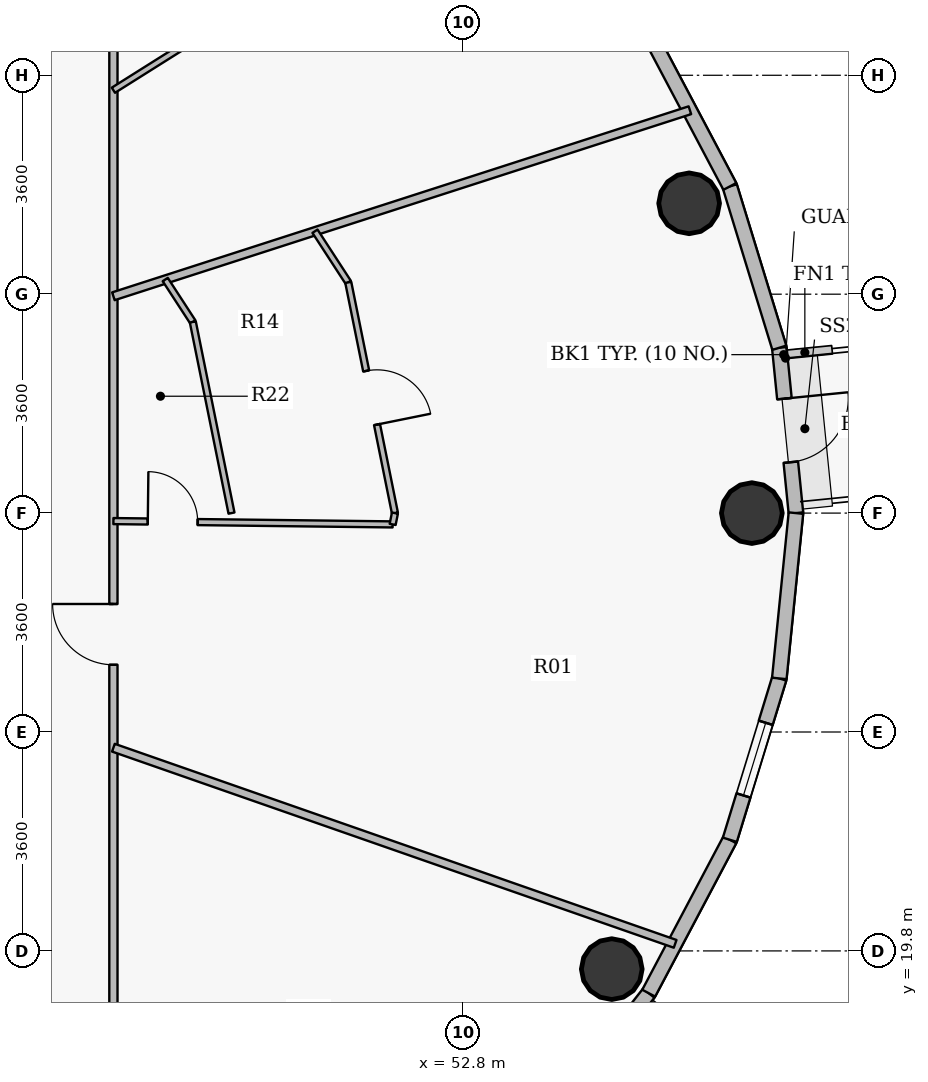
"""IFC4 building model, lengths in metres.
Left out: names, types, materials, properties, quantities, classifications, styles, units other than length and angle.
Written with IfcOpenShell. Run it as: python <this file> out.ifc"""

import sys

from ifc_helpers import new_model, si_unit, direction, frame, frame_2d, origin, origin_2d, place, context, subcontext, project, spatial, rectangle, hollow_circle, extrude, source, transform, mapped, element, fill, save


model = new_model("IFC4")
c1 = context("Model", 3, precision=1e-05, world=origin(), true_north=direction((0.0, 1.0)))
c2 = subcontext(c1, "Body", "Model", "MODEL_VIEW")
j1 = project(units=[si_unit("LENGTHUNIT", "METRE"), si_unit("PLANEANGLEUNIT", "RADIAN")], contexts=[c1])
p1 = place(None, origin())
s1 = spatial("IfcSite", under=j1, at=p1, CompositionType="ELEMENT")
p2 = place(p1, origin())
s2 = spatial("IfcBuilding", under=s1, at=p2, CompositionType="ELEMENT")
p3 = place(p2, frame((0.0, 0.0, 299.25)))
s3 = spatial("IfcBuildingStorey", under=s2, at=p3, CompositionType="ELEMENT", Elevation=299.25)
for number, where, z_axis, x_axis in (
    (1, (57.55, 27.0, 0.0), (0.0, 0.0, 1.0), (1.0, 0.0, 0.0)),
    (2, (56.519, 32.094, 0.0), (0.0, 0.0, 1.0), (1.0, 0.0, 0.0)),
    (3, (55.246, 19.5, 0.0), (0.0, 0.0, 1.0), (1.0, 0.0, 0.0)),
):
    element("IfcColumn", number, at=place(p3, frame(where, z_axis=z_axis, x_axis=x_axis)), inside=s3, PredefinedType="COLUMN", context=c2, shape_type="SweptSolid", body=[
        extrude(hollow_circle(Radius=0.5, WallThickness=0.032, at=origin_2d()), origin(), (0.0, 0.0, 1.0), 3.75),
    ])
p4 = place(p3, frame((58.002, 29.719, 0.0), z_axis=(0.0, 0.0, 1.0), x_axis=(0.099972526841, -0.99499019788, 0.0)))
e4 = element("IfcWall", 4, at=p4, inside=s3, PredefinedType="SOLIDWALL", context=c2, shape_type="SweptSolid", body=[
    extrude(rectangle(XDim=2.733, YDim=0.24, at=frame_2d((1.366, 0.0))), origin(), (0.0, 0.0, 1.0), 3.5),
])
p5 = place(p4, frame((0.841, 0.0, 0.0)))
e5 = element("IfcOpeningElement", 5, at=p5, cuts=e4, PredefinedType="OPENING", context=c2, shape_type="SweptSolid", body=[
    extrude(rectangle(XDim=1.05, YDim=2.15, at=origin_2d()), frame((0.525, 0.13, 1.075), z_axis=(0.0, -1.0, 0.0), x_axis=(1.0, 0.0, 0.0)), (0.0, 0.0, 1.0), 0.26),
])
p6 = place(p3, frame((57.188, 32.372, 0.0), z_axis=(0.0, 0.0, 1.0), x_axis=(0.2931213403, -0.956075248012, 0.0)))
e6 = element("IfcWall", 6, at=p6, inside=s3, PredefinedType="SOLIDWALL", context=c2, shape_type="SweptSolid", body=[
    extrude(rectangle(XDim=2.775, YDim=0.24, at=frame_2d((1.388, 0.0))), origin(), (0.0, 0.0, 1.0), 3.5),
])
p7 = place(p3, frame((55.854, 34.895, 0.0), z_axis=(0.0, 0.0, 1.0), x_axis=(0.467628269026, -0.883925224218, 0.0)))
e7 = element("IfcWall", 7, at=p7, inside=s3, PredefinedType="SOLIDWALL", context=c2, shape_type="SweptSolid", body=[
    extrude(rectangle(XDim=2.854, YDim=0.24, at=frame_2d((1.427, 0.0))), origin(), (0.0, 0.0, 1.0), 3.5),
])
p8 = place(p3, frame((55.854, 19.105, 0.0), z_axis=(0.0, 0.0, 1.0), x_axis=(-0.616337186556, -0.787482363275, 0.0)))
e8 = element("IfcWall", 8, at=p8, inside=s3, PredefinedType="SOLIDWALL", context=c2, shape_type="SweptSolid", body=[
    extrude(rectangle(XDim=2.958, YDim=0.24, at=frame_2d((1.479, 0.0))), origin(), (0.0, 0.0, 1.0), 3.5),
])
p9 = place(p8, frame((0.854, 0.0, 0.9)))
e9 = element("IfcOpeningElement", 9, at=p9, cuts=e8, PredefinedType="OPENING", context=c2, shape_type="SweptSolid", body=[
    extrude(rectangle(XDim=1.25, YDim=1.65, at=origin_2d()), frame((0.625, 0.13, 0.825), z_axis=(0.0, -1.0, 0.0), x_axis=(1.0, 0.0, 0.0)), (0.0, 0.0, 1.0), 0.26),
])
p10 = place(p3, frame((57.188, 21.628, 0.0), z_axis=(0.0, 0.0, 1.0), x_axis=(-0.467628269026, -0.883925224218, 0.0)))
e10 = element("IfcWall", 10, at=p10, inside=s3, PredefinedType="SOLIDWALL", context=c2, shape_type="SweptSolid", body=[
    extrude(rectangle(XDim=2.854, YDim=0.24, at=frame_2d((1.427, 0.0))), origin(), (0.0, 0.0, 1.0), 3.5),
])
p11 = place(p3, frame((58.002, 24.281, 0.0), z_axis=(0.0, 0.0, 1.0), x_axis=(-0.2931213403, -0.956075248012, 0.0)))
e11 = element("IfcWall", 11, at=p11, inside=s3, PredefinedType="SOLIDWALL", context=c2, shape_type="SweptSolid", body=[
    extrude(rectangle(XDim=2.775, YDim=0.24, at=frame_2d((1.388, 0.0))), origin(), (0.0, 0.0, 1.0), 3.5),
])
p12 = place(p11, frame((0.763, 0.0, 0.9)))
e12 = element("IfcOpeningElement", 12, at=p12, cuts=e11, PredefinedType="OPENING", context=c2, shape_type="SweptSolid", body=[
    extrude(rectangle(XDim=1.25, YDim=1.65, at=origin_2d()), frame((0.625, 0.13, 0.825), z_axis=(0.0, -1.0, 0.0), x_axis=(1.0, 0.0, 0.0)), (0.0, 0.0, 1.0), 0.26),
])
p13 = place(p3, frame((58.275, 27.0, 0.0), z_axis=(0.0, 0.0, 1.0), x_axis=(-0.099972526841, -0.99499019788, 0.0)))
e13 = element("IfcWall", 13, at=p13, inside=s3, PredefinedType="SOLIDWALL", context=c2, shape_type="SweptSolid", body=[
    extrude(rectangle(XDim=2.733, YDim=0.24, at=frame_2d((1.366, 0.0))), origin(), (0.0, 0.0, 1.0), 3.5),
])
p14 = place(p3, frame((47.05, 18.35, 0.0), z_axis=(0.0, 0.0, 1.0), x_axis=(0.0, 1.0, 0.0)))
e14 = element("IfcWall", 14, at=p14, inside=s3, PredefinedType="PARTITIONING", context=c2, shape_type="SweptSolid", body=[
    extrude(rectangle(XDim=17.3, YDim=0.135, at=frame_2d((8.65, 0.0))), origin(), (0.0, 0.0, 1.0), 3.035),
])
p15 = place(p14, frame((6.155, 0.0, 0.0)))
e15 = element("IfcOpeningElement", 15, at=p15, cuts=e14, PredefinedType="OPENING", context=c2, shape_type="SweptSolid", body=[
    extrude(rectangle(XDim=1.0, YDim=2.15, at=origin_2d()), frame((0.5, 0.078, 1.075), z_axis=(0.0, -1.0, 0.0), x_axis=(1.0, 0.0, 0.0)), (0.0, 0.0, 1.0), 0.155),
])
p16 = place(p3, frame((47.05, 23.142, 0.0), z_axis=(0.0, 0.0, 1.0), x_axis=(0.94410974345, -0.329631297547, 0.0)))
e16 = element("IfcWall", 16, at=p16, inside=s3, PredefinedType="PARTITIONING", context=c2, shape_type="SweptSolid", body=[
    extrude(rectangle(XDim=9.785, YDim=0.135, at=frame_2d((4.893, 0.0))), origin(), (0.0, 0.0, 1.0), 2.985),
])
p17 = place(p3, frame((47.05, 26.869, 0.0), z_axis=(0.0, 0.0, 1.0), x_axis=(0.999929100649, -0.011907714968, 0.0)))
e17 = element("IfcWall", 17, at=p17, inside=s3, PredefinedType="PARTITIONING", context=c2, shape_type="SweptSolid", body=[
    extrude(rectangle(XDim=4.593, YDim=0.1, at=frame_2d((2.296, 0.0))), origin(), (0.0, 0.0, 1.0), 3.035),
])
p18 = place(p17, frame((0.565, 0.0, 0.0)))
e18 = element("IfcOpeningElement", 18, at=p18, cuts=e17, PredefinedType="OPENING", context=c2, shape_type="SweptSolid", body=[
    extrude(rectangle(XDim=0.82, YDim=2.1, at=origin_2d()), frame((0.41, 0.06, 1.05), z_axis=(0.0, -1.0, 0.0), x_axis=(1.0, 0.0, 0.0)), (0.0, 0.0, 1.0), 0.12),
])
p19 = place(p3, frame((47.05, 30.565, 0.0), z_axis=(0.0, 0.0, 1.0), x_axis=(0.951682976888, 0.307082255269, 0.0)))
e19 = element("IfcWall", 19, at=p19, inside=s3, PredefinedType="PARTITIONING", context=c2, shape_type="SweptSolid", body=[
    extrude(rectangle(XDim=9.963, YDim=0.135, at=frame_2d((4.981, 0.0))), origin(), (0.0, 0.0, 1.0), 2.985),
])
p20 = place(p3, frame((47.05, 33.954, 0.0), z_axis=(0.0, 0.0, 1.0), x_axis=(0.846339777122, 0.532643390704, 0.0)))
e20 = element("IfcWall", 20, at=p20, inside=s3, PredefinedType="PARTITIONING", context=c2, shape_type="SweptSolid", body=[
    extrude(rectangle(XDim=7.395, YDim=0.1, at=frame_2d((3.698, 0.0))), origin(), (0.0, 0.0, 1.0), 2.985),
])
p21 = place(p20, frame((3.248, 0.0, 0.0)))
e21 = element("IfcOpeningElement", 21, at=p21, cuts=e20, PredefinedType="OPENING", context=c2, shape_type="SweptSolid", body=[
    extrude(rectangle(XDim=0.9, YDim=2.1, at=origin_2d()), frame((0.45, 0.06, 1.05), z_axis=(0.0, -1.0, 0.0), x_axis=(1.0, 0.0, 0.0)), (0.0, 0.0, 1.0), 0.12),
])
p22 = place(p3, frame((47.903, 30.841, 0.0), z_axis=(0.0, 0.0, 1.0), x_axis=(0.545586849168, -0.838054288227, 0.0)))
e22 = element("IfcWall", 22, at=p22, inside=s3, PredefinedType="PARTITIONING", context=c2, shape_type="SweptSolid", body=[
    extrude(rectangle(XDim=0.832, YDim=0.1, at=frame_2d((0.416, 0.0))), origin(), (0.0, 0.0, 1.0), 3.035),
])
p23 = place(p3, frame((48.356, 30.144, 0.0), z_axis=(0.0, 0.0, 1.0), x_axis=(0.198208908342, -0.98015979751, 0.0)))
e23 = element("IfcWall", 23, at=p23, inside=s3, PredefinedType="PARTITIONING", context=c2, shape_type="SweptSolid", body=[
    extrude(rectangle(XDim=3.208, YDim=0.1, at=frame_2d((1.604, 0.0))), origin(), (0.0, 0.0, 1.0), 3.035),
])
p24 = place(p3, frame((50.365, 31.635, 0.0), z_axis=(0.0, 0.0, 1.0), x_axis=(0.545458599095, -0.83813776712, 0.0)))
e24 = element("IfcWall", 24, at=p24, inside=s3, PredefinedType="PARTITIONING", context=c2, shape_type="SweptSolid", body=[
    extrude(rectangle(XDim=1.003, YDim=0.1, at=frame_2d((0.502, 0.0))), origin(), (0.0, 0.0, 1.0), 3.035),
])
p25 = place(p3, frame((50.913, 30.794, 0.0), z_axis=(0.0, 0.0, 1.0), x_axis=(0.198226068862, -0.980156327135, 0.0)))
e25 = element("IfcWall", 25, at=p25, inside=s3, PredefinedType="PARTITIONING", context=c2, shape_type="SweptSolid", body=[
    extrude(rectangle(XDim=3.871, YDim=0.1, at=frame_2d((1.936, 0.0))), origin(), (0.0, 0.0, 1.0), 3.035),
])
p26 = place(p25, frame((1.486, 0.0, 0.0)))
e26 = element("IfcOpeningElement", 26, at=p26, cuts=e25, PredefinedType="OPENING", context=c2, shape_type="SweptSolid", body=[
    extrude(rectangle(XDim=0.9, YDim=2.1, at=origin_2d()), frame((0.45, 0.06, 1.05), z_axis=(0.0, -1.0, 0.0), x_axis=(1.0, 0.0, 0.0)), (0.0, 0.0, 1.0), 0.12),
])
p27 = place(p3, frame((51.642, 26.814, 0.0), z_axis=(0.0, 0.0, 1.0), x_axis=(0.198094703821, 0.980182885138, 0.0)))
e27 = element("IfcWall", 27, at=p27, inside=s3, PredefinedType="PARTITIONING", context=c2, shape_type="SweptSolid", body=[
    extrude(rectangle(XDim=0.19, YDim=0.1, at=frame_2d((0.095, 0.0))), origin(), (0.0, 0.0, 1.0), 3.035),
])
m1 = source(origin(), c2, "Body", "SweptSolid", [
    extrude(rectangle(XDim=1.05, YDim=2.15, at=origin_2d()), frame((0.525, 0.025, 1.075), z_axis=(0.0, -1.0, 0.0), x_axis=(1.0, 0.0, 0.0)), (0.0, 0.0, 1.0), 0.05),
])
p28 = place(p5, origin())
e28 = element("IfcDoor", 28, at=p28, inside=s3, OperationType="SINGLE_SWING_LEFT", PredefinedType="DOOR", context=c2, shape_type="MappedRepresentation", body=[
    mapped(m1, transform((0.0, 0.0, 0.0), x_axis=(1.0, 0.0, 0.0), y_axis=(0.0, 1.0, 0.0), z_axis=(0.0, 0.0, 1.0), scale=1.0)),
])
fill(e5, e28)
m2 = source(origin(), c2, "Body", "SweptSolid", [
    extrude(rectangle(XDim=1.25, YDim=1.65, at=origin_2d()), frame((0.625, 0.03, 0.825), z_axis=(0.0, -1.0, 0.0), x_axis=(1.0, 0.0, 0.0)), (0.0, 0.0, 1.0), 0.06),
])
p29 = place(p12, origin())
e29 = element("IfcWindow", 29, at=p29, inside=s3, PartitioningType="SINGLE_PANEL", PredefinedType="WINDOW", context=c2, shape_type="MappedRepresentation", body=[
    mapped(m2, transform((0.0, 0.0, 0.0), x_axis=(1.0, 0.0, 0.0), y_axis=(0.0, 1.0, 0.0), z_axis=(0.0, 0.0, 1.0), scale=1.0)),
])
fill(e12, e29)
m3 = source(origin(), c2, "Body", "SweptSolid", [
    extrude(rectangle(XDim=1.0, YDim=2.15, at=origin_2d()), frame((0.5, 0.025, 1.075), z_axis=(0.0, -1.0, 0.0), x_axis=(1.0, 0.0, 0.0)), (0.0, 0.0, 1.0), 0.05),
])
p30 = place(p15, origin())
e30 = element("IfcDoor", 30, at=p30, inside=s3, OperationType="SINGLE_SWING_RIGHT", PredefinedType="DOOR", context=c2, shape_type="MappedRepresentation", body=[
    mapped(m3, transform((0.0, 0.0, 0.0), x_axis=(1.0, 0.0, 0.0), y_axis=(0.0, 1.0, 0.0), z_axis=(0.0, 0.0, 1.0), scale=1.0)),
])
fill(e15, e30)
m4 = source(origin(), c2, "Body", "SweptSolid", [
    extrude(rectangle(XDim=0.82, YDim=2.1, at=origin_2d()), frame((0.41, 0.025, 1.05), z_axis=(0.0, -1.0, 0.0), x_axis=(1.0, 0.0, 0.0)), (0.0, 0.0, 1.0), 0.05),
])
p31 = place(p18, origin())
e31 = element("IfcDoor", 31, at=p31, inside=s3, OperationType="SINGLE_SWING_LEFT", PredefinedType="DOOR", context=c2, shape_type="MappedRepresentation", body=[
    mapped(m4, transform((0.0, 0.0, 0.0), x_axis=(1.0, 0.0, 0.0), y_axis=(0.0, 1.0, 0.0), z_axis=(0.0, 0.0, 1.0), scale=1.0)),
])
fill(e18, e31)
m5 = source(origin(), c2, "Body", "SweptSolid", [
    extrude(rectangle(XDim=0.9, YDim=2.1, at=origin_2d()), frame((0.45, 0.025, 1.05), z_axis=(0.0, -1.0, 0.0), x_axis=(1.0, 0.0, 0.0)), (0.0, 0.0, 1.0), 0.05),
])
p32 = place(p26, origin())
e32 = element("IfcDoor", 32, at=p32, inside=s3, OperationType="SINGLE_SWING_RIGHT", PredefinedType="DOOR", context=c2, shape_type="MappedRepresentation", body=[
    mapped(m5, transform((0.0, 0.0, 0.0), x_axis=(1.0, 0.0, 0.0), y_axis=(0.0, 1.0, 0.0), z_axis=(0.0, 0.0, 1.0), scale=1.0)),
])
fill(e26, e32)
save(model, sys.argv[1])
